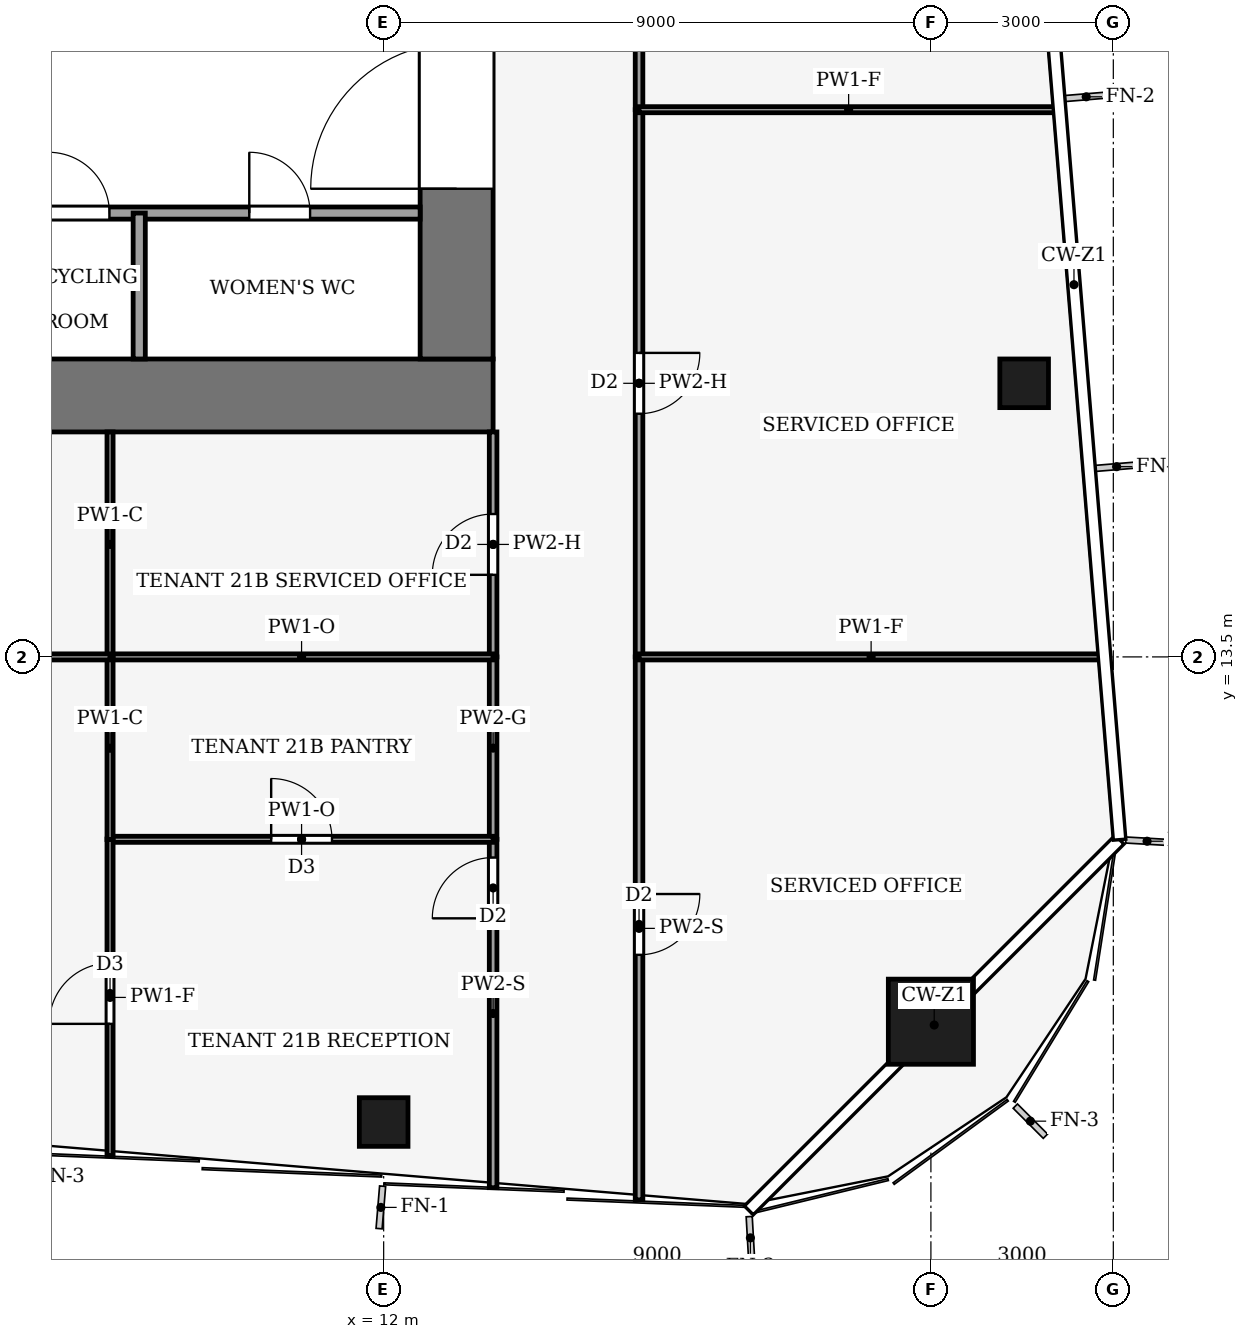
"""IFC4 building model, lengths in metres.
Left out: names, types, materials, properties, quantities, classifications, styles, units other than length and angle.
Written with IfcOpenShell. Run it as: python <this file> out.ifc"""

import sys

from ifc_helpers import new_model, si_unit, direction, frame, frame_2d, origin, origin_2d, place, context, subcontext, project, spatial, rectangle, hollow_rectangle, extrude, element, fill, save


model = new_model("IFC4")
c1 = context("Model", 3, precision=1e-05, world=origin(), true_north=direction((0.0, 1.0)))
c2 = subcontext(c1, "Body", "Model", "MODEL_VIEW")
j1 = project(units=[si_unit("LENGTHUNIT", "METRE"), si_unit("PLANEANGLEUNIT", "RADIAN")], contexts=[c1])
p1 = place(None, origin())
s1 = spatial("IfcSite", under=j1, at=p1, CompositionType="ELEMENT")
p2 = place(p1, origin())
s2 = spatial("IfcBuilding", under=s1, at=p2, CompositionType="ELEMENT")
p3 = place(p2, frame((0.0, 0.0, 94.0)))
s3 = spatial("IfcBuildingStorey", under=s2, at=p3, CompositionType="ELEMENT", Elevation=94.0)
p4 = place(p3, frame((-13.8, 17.8, -0.13), z_axis=(0.0, 0.0, 1.0), x_axis=(1.0, 0.0, 0.0)))
e1 = element("IfcWall", 1, at=p4, inside=s3, PredefinedType="SHEAR", context=c2, shape_type="SweptSolid", body=[
    extrude(rectangle(XDim=27.6, YDim=1.2, at=frame_2d((13.8, 0.0))), origin(), (0.0, 0.0, 1.0), 4.0),
])
p5 = place(p3, frame((13.2, 18.4, -0.13), z_axis=(0.0, 0.0, 1.0), x_axis=(0.0, 1.0, 0.0)))
e2 = element("IfcWall", 2, at=p5, inside=s3, PredefinedType="SHEAR", context=c2, shape_type="SweptSolid", body=[
    extrude(rectangle(XDim=19.2, YDim=1.2, at=frame_2d((9.6, 0.0))), origin(), (0.0, 0.0, 1.0), 4.0),
])
p6 = place(p5, frame((2.8, 0.0, 0.13)))
e3 = element("IfcOpeningElement", 3, at=p6, cuts=e2, PredefinedType="OPENING", context=c2, shape_type="SweptSolid", body=[
    extrude(rectangle(XDim=2.4, YDim=2.4, at=frame_2d((1.2, 1.2))), frame((0.0, 0.61, 0.0), z_axis=(0.0, -1.0, 0.0), x_axis=(1.0, 0.0, 0.0)), (0.0, 0.0, 1.0), 1.22),
])
p7 = place(p5, frame((13.3, 0.0, 0.13)))
e4 = element("IfcOpeningElement", 4, at=p7, cuts=e2, PredefinedType="OPENING", context=c2, shape_type="SweptSolid", body=[
    extrude(rectangle(XDim=2.4, YDim=2.4, at=frame_2d((1.2, 1.2))), frame((0.0, 0.61, 0.0), z_axis=(0.0, -1.0, 0.0), x_axis=(1.0, 0.0, 0.0)), (0.0, 0.0, 1.0), 1.22),
])
p8 = place(p3, frame((21.0, 7.5, 0.0), z_axis=(0.0, 0.0, 1.0), x_axis=(1.0, 0.0, 0.0)))
e5 = element("IfcColumn", 5, at=p8, inside=s3, PredefinedType="COLUMN", context=c2, shape_type="SweptSolid", body=[
    extrude(hollow_rectangle(XDim=1.4, YDim=1.4, WallThickness=0.08, at=origin_2d()), origin(), (0.0, 0.0, 1.0), 4.0),
])
for number, where, z_axis, x_axis in (
    (6, (12.0, 5.85, 0.0), (0.0, 0.0, 1.0), (1.0, 0.0, 0.0)),
    (7, (22.534, 18.0, 0.0), (0.0, 0.0, 1.0), (1.0, 0.0, 0.0)),
):
    element("IfcColumn", number, at=place(p3, frame(where, z_axis=z_axis, x_axis=x_axis)), inside=s3, PredefinedType="COLUMN", context=c2, shape_type="SweptSolid", body=[
        extrude(hollow_rectangle(XDim=0.8, YDim=0.8, WallThickness=0.04, at=origin_2d()), origin(), (0.0, 0.0, 1.0), 4.0),
    ])
p9 = place(p3, frame((6.0, 20.8, 0.0), z_axis=(0.0, 0.0, 1.0), x_axis=(1.0, 0.0, 0.0)))
e8 = element("IfcWall", 8, at=p9, inside=s3, PredefinedType="PARTITIONING", context=c2, shape_type="SweptSolid", body=[
    extrude(rectangle(XDim=6.6, YDim=0.2, at=frame_2d((3.3, 0.0))), origin(), (0.0, 0.0, 1.0), 3.87),
])
p10 = place(p9, frame((0.49, 0.0, 0.0)))
e9 = element("IfcOpeningElement", 9, at=p10, cuts=e8, PredefinedType="OPENING", context=c2, shape_type="SweptSolid", body=[
    extrude(rectangle(XDim=1.0, YDim=2.1, at=frame_2d((0.5, 1.05))), frame((0.0, 0.11, 0.0), z_axis=(0.0, -1.0, 0.0), x_axis=(1.0, 0.0, 0.0)), (0.0, 0.0, 1.0), 0.22),
])
p11 = place(p9, frame((3.79, 0.0, 0.0)))
e10 = element("IfcOpeningElement", 10, at=p11, cuts=e8, PredefinedType="OPENING", context=c2, shape_type="SweptSolid", body=[
    extrude(rectangle(XDim=1.0, YDim=2.1, at=frame_2d((0.5, 1.05))), frame((0.0, 0.11, 0.0), z_axis=(0.0, -1.0, 0.0), x_axis=(1.0, 0.0, 0.0)), (0.0, 0.0, 1.0), 0.22),
])
p12 = place(p3, frame((7.98, 18.4, 0.0), z_axis=(0.0, 0.0, 1.0), x_axis=(0.0, 1.0, 0.0)))
e11 = element("IfcWall", 11, at=p12, inside=s3, PredefinedType="PARTITIONING", context=c2, shape_type="SweptSolid", body=[
    extrude(rectangle(XDim=2.4, YDim=0.2, at=frame_2d((1.2, 0.0))), origin(), (0.0, 0.0, 1.0), 3.87),
])
p13 = place(p3, frame((16.2, 13.5, 0.0), z_axis=(0.0, 0.0, 1.0), x_axis=(0.0, -1.0, 0.0)))
e12 = element("IfcWall", 12, at=p13, inside=s3, PredefinedType="PARTITIONING", context=c2, shape_type="SweptSolid", body=[
    extrude(rectangle(XDim=8.93, YDim=0.125, at=frame_2d((4.465, 0.0))), origin(), (0.0, 0.0, 1.0), 3.04),
])
p14 = place(p13, frame((3.9, 0.0, 0.0)))
e13 = element("IfcOpeningElement", 13, at=p14, cuts=e12, PredefinedType="OPENING", context=c2, shape_type="SweptSolid", body=[
    extrude(rectangle(XDim=1.0, YDim=2.1, at=frame_2d((0.5, 1.05))), frame((0.0, 0.073, 0.0), z_axis=(0.0, -1.0, 0.0), x_axis=(1.0, 0.0, 0.0)), (0.0, 0.0, 1.0), 0.145),
])
p15 = place(p3, frame((16.2, 22.5, 0.0), z_axis=(0.0, 0.0, 1.0), x_axis=(0.0, -1.0, 0.0)))
e14 = element("IfcWall", 14, at=p15, inside=s3, PredefinedType="PARTITIONING", context=c2, shape_type="SweptSolid", body=[
    extrude(rectangle(XDim=9.0, YDim=0.125, at=frame_2d((4.5, 0.0))), origin(), (0.0, 0.0, 1.0), 3.14),
])
p16 = place(p15, frame((4.0, 0.0, 0.0)))
e15 = element("IfcOpeningElement", 15, at=p16, cuts=e14, PredefinedType="OPENING", context=c2, shape_type="SweptSolid", body=[
    extrude(rectangle(XDim=1.0, YDim=2.1, at=frame_2d((0.5, 1.05))), frame((0.0, 0.073, 0.0), z_axis=(0.0, -1.0, 0.0), x_axis=(1.0, 0.0, 0.0)), (0.0, 0.0, 1.0), 0.145),
])
p17 = place(p3, frame((16.2, 31.5, 0.0), z_axis=(0.0, 0.0, 1.0), x_axis=(0.0, -1.0, 0.0)))
e16 = element("IfcWall", 16, at=p17, inside=s3, PredefinedType="PARTITIONING", context=c2, shape_type="SweptSolid", body=[
    extrude(rectangle(XDim=9.0, YDim=0.125, at=frame_2d((4.5, 0.0))), origin(), (0.0, 0.0, 1.0), 3.48),
])
p18 = place(p17, frame((4.0, 0.0, 0.0)))
e17 = element("IfcOpeningElement", 17, at=p18, cuts=e16, PredefinedType="OPENING", context=c2, shape_type="SweptSolid", body=[
    extrude(rectangle(XDim=1.0, YDim=2.1, at=frame_2d((0.5, 1.05))), frame((0.0, 0.073, 0.0), z_axis=(0.0, -1.0, 0.0), x_axis=(1.0, 0.0, 0.0)), (0.0, 0.0, 1.0), 0.145),
])
p19 = place(p3, frame((13.8, 4.77, 0.0), z_axis=(0.0, 0.0, 1.0), x_axis=(0.0, 1.0, 0.0)))
e18 = element("IfcWall", 18, at=p19, inside=s3, PredefinedType="PARTITIONING", context=c2, shape_type="SweptSolid", body=[
    extrude(rectangle(XDim=5.73, YDim=0.125, at=frame_2d((2.865, 0.0))), origin(), (0.0, 0.0, 1.0), 3.04),
])
p20 = place(p19, frame((4.43, 0.0, 0.0)))
e19 = element("IfcOpeningElement", 19, at=p20, cuts=e18, PredefinedType="OPENING", context=c2, shape_type="SweptSolid", body=[
    extrude(rectangle(XDim=1.0, YDim=2.1, at=frame_2d((0.5, 1.05))), frame((0.0, 0.073, 0.0), z_axis=(0.0, -1.0, 0.0), x_axis=(1.0, 0.0, 0.0)), (0.0, 0.0, 1.0), 0.145),
])
p21 = place(p3, frame((13.8, 13.5, 0.0), z_axis=(0.0, 0.0, 1.0), x_axis=(0.0, -1.0, 0.0)))
e20 = element("IfcWall", 20, at=p21, inside=s3, PredefinedType="PARTITIONING", context=c2, shape_type="SweptSolid", body=[
    extrude(rectangle(XDim=3.0, YDim=0.125, at=frame_2d((1.5, 0.0))), origin(), (0.0, 0.0, 1.0), 3.87),
])
p22 = place(p3, frame((13.8, 13.5, 0.0), z_axis=(0.0, 0.0, 1.0), x_axis=(0.0, 1.0, 0.0)))
e21 = element("IfcWall", 21, at=p22, inside=s3, PredefinedType="PARTITIONING", context=c2, shape_type="SweptSolid", body=[
    extrude(rectangle(XDim=3.7, YDim=0.125, at=frame_2d((1.85, 0.0))), origin(), (0.0, 0.0, 1.0), 3.14),
])
p23 = place(p22, frame((1.35, 0.0, 0.0)))
e22 = element("IfcOpeningElement", 22, at=p23, cuts=e21, PredefinedType="OPENING", context=c2, shape_type="SweptSolid", body=[
    extrude(rectangle(XDim=1.0, YDim=2.1, at=frame_2d((0.5, 1.05))), frame((0.0, 0.073, 0.0), z_axis=(0.0, -1.0, 0.0), x_axis=(1.0, 0.0, 0.0)), (0.0, 0.0, 1.0), 0.145),
])
p24 = place(p3, frame((23.833, 13.5, 0.0), z_axis=(0.0, 0.0, 1.0), x_axis=(-1.0, 0.0, 0.0)))
e23 = element("IfcWall", 23, at=p24, inside=s3, PredefinedType="PARTITIONING", context=c2, shape_type="SweptSolid", body=[
    extrude(rectangle(XDim=7.634, YDim=0.1, at=frame_2d((3.817, 0.0))), origin(), (0.0, 0.0, 1.0), 3.04),
])
p25 = place(p3, frame((23.094, 22.5, 0.0), z_axis=(0.0, 0.0, 1.0), x_axis=(-1.0, 0.0, 0.0)))
e24 = element("IfcWall", 24, at=p25, inside=s3, PredefinedType="PARTITIONING", context=c2, shape_type="SweptSolid", body=[
    extrude(rectangle(XDim=6.894, YDim=0.1, at=frame_2d((3.447, 0.0))), origin(), (0.0, 0.0, 1.0), 3.04),
])
p26 = place(p3, frame((7.5, 10.5, 0.0), z_axis=(0.0, 0.0, 1.0), x_axis=(1.0, 0.0, 0.0)))
e25 = element("IfcWall", 25, at=p26, inside=s3, PredefinedType="PARTITIONING", context=c2, shape_type="SweptSolid", body=[
    extrude(rectangle(XDim=6.3, YDim=0.1, at=frame_2d((3.15, 0.0))), origin(), (0.0, 0.0, 1.0), 3.39),
])
p27 = place(p26, frame((2.65, 0.0, 0.0)))
e26 = element("IfcOpeningElement", 26, at=p27, cuts=e25, PredefinedType="OPENING", context=c2, shape_type="SweptSolid", body=[
    extrude(rectangle(XDim=1.0, YDim=2.1, at=frame_2d((0.5, 1.05))), frame((0.0, 0.06, 0.0), z_axis=(0.0, -1.0, 0.0), x_axis=(1.0, 0.0, 0.0)), (0.0, 0.0, 1.0), 0.12),
])
p28 = place(p3, frame((7.5, 5.295, 0.0), z_axis=(0.0, 0.0, 1.0), x_axis=(0.0, 1.0, 0.0)))
e27 = element("IfcWall", 27, at=p28, inside=s3, PredefinedType="PARTITIONING", context=c2, shape_type="SweptSolid", body=[
    extrude(rectangle(XDim=5.209, YDim=0.1, at=frame_2d((2.604, 0.0))), origin(), (0.0, 0.0, 1.0), 3.04),
])
p29 = place(p28, frame((2.17, 0.0, 0.0)))
e28 = element("IfcOpeningElement", 28, at=p29, cuts=e27, PredefinedType="OPENING", context=c2, shape_type="SweptSolid", body=[
    extrude(rectangle(XDim=1.0, YDim=2.1, at=frame_2d((0.5, 1.05))), frame((0.0, 0.06, 0.0), z_axis=(0.0, -1.0, 0.0), x_axis=(1.0, 0.0, 0.0)), (0.0, 0.0, 1.0), 0.12),
])
p30 = place(p3, frame((13.8, 13.5, 0.0), z_axis=(0.0, 0.0, 1.0), x_axis=(-1.0, 0.0, 0.0)))
e29 = element("IfcWall", 29, at=p30, inside=s3, PredefinedType="PARTITIONING", context=c2, shape_type="SweptSolid", body=[
    extrude(rectangle(XDim=6.3, YDim=0.1, at=frame_2d((3.15, 0.0))), origin(), (0.0, 0.0, 1.0), 3.39),
])
p31 = place(p3, frame((7.5, 13.5, 0.0), z_axis=(0.0, 0.0, 1.0), x_axis=(0.0, -1.0, 0.0)))
e30 = element("IfcWall", 30, at=p31, inside=s3, PredefinedType="PARTITIONING", context=c2, shape_type="SweptSolid", body=[
    extrude(rectangle(XDim=3.004, YDim=0.1, at=frame_2d((1.502, 0.0))), origin(), (0.0, 0.0, 1.0), 3.87),
])
p32 = place(p3, frame((7.5, 17.2, 0.0), z_axis=(0.0, 0.0, 1.0), x_axis=(0.0, -1.0, 0.0)))
e31 = element("IfcWall", 31, at=p32, inside=s3, PredefinedType="PARTITIONING", context=c2, shape_type="SweptSolid", body=[
    extrude(rectangle(XDim=3.7, YDim=0.1, at=frame_2d((1.85, 0.0))), origin(), (0.0, 0.0, 1.0), 3.87),
])
p33 = place(p3, frame((0.0, 13.5, 0.0), z_axis=(0.0, 0.0, 1.0), x_axis=(1.0, 0.0, 0.0)))
e32 = element("IfcWall", 32, at=p33, inside=s3, PredefinedType="PARTITIONING", context=c2, shape_type="SweptSolid", body=[
    extrude(rectangle(XDim=7.5, YDim=0.1, at=frame_2d((3.75, 0.0))), origin(), (0.0, 0.0, 1.0), 3.44),
])
p34 = place(p33, frame((3.25, 0.0, 0.0)))
e33 = element("IfcOpeningElement", 33, at=p34, cuts=e32, PredefinedType="OPENING", context=c2, shape_type="SweptSolid", body=[
    extrude(rectangle(XDim=1.0, YDim=2.1, at=frame_2d((0.5, 1.05))), frame((0.0, 0.06, 0.0), z_axis=(0.0, -1.0, 0.0), x_axis=(1.0, 0.0, 0.0)), (0.0, 0.0, 1.0), 0.12),
])
p35 = place(p10, origin())
e34 = element("IfcDoor", 34, at=p35, inside=s3, OperationType="SINGLE_SWING_RIGHT", PredefinedType="DOOR", context=c2, shape_type="SweptSolid", body=[
    extrude(rectangle(XDim=1.0, YDim=2.1, at=frame_2d((0.5, 1.05))), frame((0.0, 0.025, 0.0), z_axis=(0.0, -1.0, 0.0), x_axis=(1.0, 0.0, 0.0)), (0.0, 0.0, 1.0), 0.05),
])
fill(e9, e34)
p36 = place(p11, origin())
e35 = element("IfcDoor", 35, at=p36, inside=s3, OperationType="SINGLE_SWING_RIGHT", PredefinedType="DOOR", context=c2, shape_type="SweptSolid", body=[
    extrude(rectangle(XDim=1.0, YDim=2.1, at=frame_2d((0.5, 1.05))), frame((0.0, 0.025, 0.0), z_axis=(0.0, -1.0, 0.0), x_axis=(1.0, 0.0, 0.0)), (0.0, 0.0, 1.0), 0.05),
])
fill(e10, e35)
p37 = place(p6, origin())
e36 = element("IfcDoor", 36, at=p37, inside=s3, OperationType="DOUBLE_DOOR_SINGLE_SWING", PredefinedType="DOOR", context=c2, shape_type="SweptSolid", body=[
    extrude(rectangle(XDim=2.4, YDim=2.4, at=frame_2d((1.2, 1.2))), frame((0.0, 0.025, 0.0), z_axis=(0.0, -1.0, 0.0), x_axis=(1.0, 0.0, 0.0)), (0.0, 0.0, 1.0), 0.05),
])
fill(e3, e36)
p38 = place(p14, origin())
e37 = element("IfcDoor", 37, at=p38, inside=s3, OperationType="SINGLE_SWING_LEFT", PredefinedType="DOOR", context=c2, shape_type="SweptSolid", body=[
    extrude(rectangle(XDim=1.0, YDim=2.1, at=frame_2d((0.5, 1.05))), frame((0.0, 0.025, 0.0), z_axis=(0.0, -1.0, 0.0), x_axis=(1.0, 0.0, 0.0)), (0.0, 0.0, 1.0), 0.05),
])
fill(e13, e37)
p39 = place(p16, origin())
e38 = element("IfcDoor", 38, at=p39, inside=s3, OperationType="SINGLE_SWING_RIGHT", PredefinedType="DOOR", context=c2, shape_type="SweptSolid", body=[
    extrude(rectangle(XDim=1.0, YDim=2.1, at=frame_2d((0.5, 1.05))), frame((0.0, 0.025, 0.0), z_axis=(0.0, -1.0, 0.0), x_axis=(1.0, 0.0, 0.0)), (0.0, 0.0, 1.0), 0.05),
])
fill(e15, e38)
p40 = place(p20, origin())
e39 = element("IfcDoor", 39, at=p40, inside=s3, OperationType="SINGLE_SWING_RIGHT", PredefinedType="DOOR", context=c2, shape_type="SweptSolid", body=[
    extrude(rectangle(XDim=1.0, YDim=2.1, at=frame_2d((0.5, 1.05))), frame((0.0, 0.025, 0.0), z_axis=(0.0, -1.0, 0.0), x_axis=(1.0, 0.0, 0.0)), (0.0, 0.0, 1.0), 0.05),
])
fill(e19, e39)
p41 = place(p23, origin())
e40 = element("IfcDoor", 40, at=p41, inside=s3, OperationType="SINGLE_SWING_LEFT", PredefinedType="DOOR", context=c2, shape_type="SweptSolid", body=[
    extrude(rectangle(XDim=1.0, YDim=2.1, at=frame_2d((0.5, 1.05))), frame((0.0, 0.025, 0.0), z_axis=(0.0, -1.0, 0.0), x_axis=(1.0, 0.0, 0.0)), (0.0, 0.0, 1.0), 0.05),
])
fill(e22, e40)
p42 = place(p27, origin())
e41 = element("IfcDoor", 41, at=p42, inside=s3, OperationType="SINGLE_SWING_RIGHT", PredefinedType="DOOR", context=c2, shape_type="SweptSolid", body=[
    extrude(rectangle(XDim=1.0, YDim=2.1, at=frame_2d((0.5, 1.05))), frame((0.0, 0.025, 0.0), z_axis=(0.0, -1.0, 0.0), x_axis=(1.0, 0.0, 0.0)), (0.0, 0.0, 1.0), 0.05),
])
fill(e26, e41)
p43 = place(p29, origin())
e42 = element("IfcDoor", 42, at=p43, inside=s3, OperationType="SINGLE_SWING_RIGHT", PredefinedType="DOOR", context=c2, shape_type="SweptSolid", body=[
    extrude(rectangle(XDim=1.0, YDim=2.1, at=frame_2d((0.5, 1.05))), frame((0.0, 0.025, 0.0), z_axis=(0.0, -1.0, 0.0), x_axis=(1.0, 0.0, 0.0)), (0.0, 0.0, 1.0), 0.05),
])
fill(e28, e42)
save(model, sys.argv[1])
